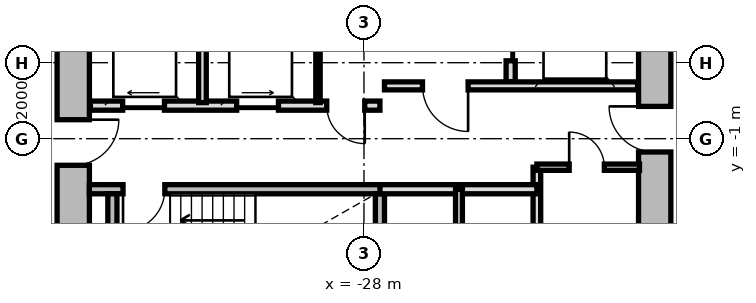
"""IFC4 building model, lengths in metres.
Left out: names, types, materials, properties, quantities, classifications, styles, units other than length and angle.
Written with IfcOpenShell. Run it as: python <this file> out.ifc"""

import sys

from ifc_helpers import new_model, si_unit, direction, frame, frame_2d, origin, place, context, subcontext, project, spatial, rectangle, extrude, source, transform, mapped, element, fill, save


model = new_model("IFC4")
c1 = context("Model", 3, precision=1e-05, world=origin(), true_north=direction((0.0, 1.0)))
c2 = subcontext(c1, "Body", "Model", "MODEL_VIEW")
j1 = project(units=[si_unit("LENGTHUNIT", "METRE"), si_unit("PLANEANGLEUNIT", "RADIAN")], contexts=[c1])
p1 = place(None, origin())
s1 = spatial("IfcSite", under=j1, at=p1, CompositionType="ELEMENT")
p2 = place(p1, origin())
s2 = spatial("IfcBuilding", under=s1, at=p2, CompositionType="ELEMENT")
p3 = place(p2, frame((0.0, 0.0, 61.25)))
s3 = spatial("IfcBuildingStorey", under=s2, at=p3, CompositionType="ELEMENT", Elevation=61.25)
m1 = source(origin(), c2, "Body", "SweptSolid", [
    extrude(rectangle(XDim=11.0, YDim=0.85, at=frame_2d((5.5, 0.0))), origin(), (0.0, 0.0, 1.0), 2.79),
])
p4 = place(p3, frame((-35.65, -5.5, 0.0), z_axis=(0.0, 0.0, 1.0), x_axis=(0.0, 1.0, 0.0)))
e1 = element("IfcWall", 1, at=p4, inside=s3, PredefinedType="SHEAR", context=c2, shape_type="MappedRepresentation", body=[
    mapped(m1, transform((0.0, 0.0, 0.0), x_axis=(1.0, 0.0, 0.0), y_axis=(0.0, 1.0, 0.0), z_axis=(0.0, 0.0, 1.0), scale=1.0)),
])
p5 = place(p4, frame((3.8, 0.0, 0.0)))
e2 = element("IfcOpeningElement", 2, at=p5, cuts=e1, PredefinedType="OPENING", context=c2, shape_type="SweptSolid", body=[
    extrude(rectangle(XDim=1.2, YDim=2.15, at=frame_2d((0.6, 1.075))), frame((0.0, 0.435, 0.0), z_axis=(0.0, -1.0, 0.0), x_axis=(1.0, 0.0, 0.0)), (0.0, 0.0, 1.0), 0.87),
])
p6 = place(p3, frame((-20.35, 5.5, 0.0), z_axis=(0.0, 0.0, 1.0), x_axis=(0.0, -1.0, 0.0)))
e3 = element("IfcWall", 3, at=p6, inside=s3, PredefinedType="SHEAR", context=c2, shape_type="MappedRepresentation", body=[
    mapped(m1, transform((0.0, 0.0, 0.0), x_axis=(1.0, 0.0, 0.0), y_axis=(0.0, 1.0, 0.0), z_axis=(0.0, 0.0, 1.0), scale=1.0)),
])
p7 = place(p6, frame((5.65, 0.0, 0.0)))
e4 = element("IfcOpeningElement", 4, at=p7, cuts=e3, PredefinedType="OPENING", context=c2, shape_type="SweptSolid", body=[
    extrude(rectangle(XDim=1.2, YDim=2.15, at=frame_2d((0.6, 1.075))), frame((0.0, 0.435, 0.0), z_axis=(0.0, -1.0, 0.0), x_axis=(1.0, 0.0, 0.0)), (0.0, 0.0, 1.0), 0.87),
])
m2 = source(origin(), c2, "Body", "SweptSolid", [
    extrude(rectangle(XDim=7.765, YDim=0.24, at=frame_2d((3.883, 0.0))), origin(), (0.0, 0.0, 1.0), 2.79),
])
p8 = place(p3, frame((-35.225, -2.33, 0.0), z_axis=(0.0, 0.0, 1.0), x_axis=(1.0, 0.0, 0.0)))
e5 = element("IfcWall", 5, at=p8, inside=s3, PredefinedType="PARTITIONING", context=c2, shape_type="MappedRepresentation", body=[
    mapped(m2, transform((0.0, 0.0, 0.0), x_axis=(1.0, 0.0, 0.0), y_axis=(0.0, 1.0, 0.0), z_axis=(0.0, 0.0, 1.0), scale=1.0)),
])
p9 = place(p8, frame((0.885, 0.0, 0.0)))
e6 = element("IfcOpeningElement", 6, at=p9, cuts=e5, PredefinedType="OPENING", context=c2, shape_type="SweptSolid", body=[
    extrude(rectangle(XDim=1.1, YDim=2.15, at=frame_2d((0.55, 1.075))), frame((0.0, 0.13, 0.0), z_axis=(0.0, -1.0, 0.0), x_axis=(1.0, 0.0, 0.0)), (0.0, 0.0, 1.0), 0.26),
])
m3 = source(origin(), c2, "Body", "SweptSolid", [
    extrude(rectangle(XDim=3.075, YDim=0.24, at=frame_2d((1.538, 0.0))), origin(), (0.0, 0.0, 1.0), 2.79),
])
for number, where, z_axis, x_axis in (
    (7, (-34.62, -5.525, 0.0), (0.0, 0.0, 1.0), (0.0, 1.0, 0.0)),
    (8, (-27.58, -5.525, 0.0), (0.0, 0.0, 1.0), (0.0, 1.0, 0.0)),
):
    element("IfcWall", number, at=place(p3, frame(where, z_axis=z_axis, x_axis=x_axis)), inside=s3, PredefinedType="PARTITIONING", context=c2, shape_type="MappedRepresentation", body=[
        mapped(m3, transform((0.0, 0.0, 0.0), x_axis=(1.0, 0.0, 0.0), y_axis=(0.0, 1.0, 0.0), z_axis=(0.0, 0.0, 1.0), scale=1.0)),
    ])
m4 = source(origin(), c2, "Body", "SweptSolid", [
    extrude(rectangle(XDim=5.0, YDim=0.24, at=frame_2d((2.5, 0.0))), origin(), (0.0, 0.0, 1.0), 2.775),
])
p10 = place(p3, frame((-24.14, 0.5, 0.0), z_axis=(0.0, 0.0, 1.0), x_axis=(0.0, 1.0, 0.0)))
e9 = element("IfcWall", 9, at=p10, inside=s3, PredefinedType="PARTITIONING", context=c2, shape_type="MappedRepresentation", body=[
    mapped(m4, transform((0.0, 0.0, 0.0), x_axis=(1.0, 0.0, 0.0), y_axis=(0.0, 1.0, 0.0), z_axis=(0.0, 0.0, 1.0), scale=1.0)),
])
p11 = place(p10, frame((3.05, 0.0, 0.0)))
e10 = element("IfcOpeningElement", 10, at=p11, cuts=e9, PredefinedType="OPENING", context=c2, shape_type="SweptSolid", body=[
    extrude(rectangle(XDim=1.3, YDim=2.2, at=frame_2d((0.65, 1.1))), frame((0.0, 0.13, 0.0), z_axis=(0.0, -1.0, 0.0), x_axis=(1.0, 0.0, 0.0)), (0.0, 0.0, 1.0), 0.26),
])
p12 = place(p10, frame((0.55, 0.0, 0.0)))
e11 = element("IfcOpeningElement", 11, at=p12, cuts=e9, PredefinedType="OPENING", context=c2, shape_type="SweptSolid", body=[
    extrude(rectangle(XDim=1.3, YDim=2.2, at=frame_2d((0.65, 1.1))), frame((0.0, 0.13, 0.0), z_axis=(0.0, -1.0, 0.0), x_axis=(1.0, 0.0, 0.0)), (0.0, 0.0, 1.0), 0.26),
])
m5 = source(origin(), c2, "Body", "SweptSolid", [
    extrude(rectangle(XDim=6.66, YDim=0.21, at=frame_2d((3.33, 0.0))), origin(), (0.0, 0.0, 1.0), 2.775),
])
p13 = place(p3, frame((-27.46, 0.39, 0.0), z_axis=(0.0, 0.0, 1.0), x_axis=(1.0, 0.0, 0.0)))
e12 = element("IfcWall", 12, at=p13, inside=s3, PredefinedType="PARTITIONING", context=c2, shape_type="MappedRepresentation", body=[
    mapped(m5, transform((0.0, 0.0, 0.0), x_axis=(1.0, 0.0, 0.0), y_axis=(0.0, 1.0, 0.0), z_axis=(0.0, 0.0, 1.0), scale=1.0)),
])
p14 = place(p13, frame((1.0, 0.0, 0.0)))
e13 = element("IfcOpeningElement", 13, at=p14, cuts=e12, PredefinedType="OPENING", context=c2, shape_type="SweptSolid", body=[
    extrude(rectangle(XDim=1.2, YDim=2.15, at=frame_2d((0.6, 1.075))), frame((0.0, 0.115, 0.0), z_axis=(0.0, -1.0, 0.0), x_axis=(1.0, 0.0, 0.0)), (0.0, 0.0, 1.0), 0.23),
])
m6 = source(origin(), c2, "Body", "SweptSolid", [
    extrude(rectangle(XDim=7.62, YDim=0.24, at=frame_2d((3.81, 0.0))), origin(), (0.0, 0.0, 1.0), 2.775),
])
p15 = place(p3, frame((-35.2, -0.13, 0.0), z_axis=(0.0, 0.0, 1.0), x_axis=(1.0, 0.0, 0.0)))
e14 = element("IfcWall", 14, at=p15, inside=s3, PredefinedType="PARTITIONING", context=c2, shape_type="MappedRepresentation", body=[
    mapped(m6, transform((0.0, 0.0, 0.0), x_axis=(1.0, 0.0, 0.0), y_axis=(0.0, 1.0, 0.0), z_axis=(0.0, 0.0, 1.0), scale=1.0)),
])
p16 = place(p15, frame((6.22, 0.0, 0.0)))
e15 = element("IfcOpeningElement", 15, at=p16, cuts=e14, PredefinedType="OPENING", context=c2, shape_type="SweptSolid", body=[
    extrude(rectangle(XDim=1.0, YDim=2.1, at=frame_2d((0.5, 1.05))), frame((0.0, 0.13, 0.0), z_axis=(0.0, -1.0, 0.0), x_axis=(1.0, 0.0, 0.0)), (0.0, 0.0, 1.0), 0.26),
])
p17 = place(p15, frame((0.85, 0.0, 0.0)))
e16 = element("IfcOpeningElement", 16, at=p17, cuts=e14, PredefinedType="OPENING", context=c2, shape_type="SweptSolid", body=[
    extrude(rectangle(XDim=1.1, YDim=2.2, at=frame_2d((0.55, 1.1))), frame((0.0, 0.13, 0.0), z_axis=(0.0, -1.0, 0.0), x_axis=(1.0, 0.0, 0.0)), (0.0, 0.0, 1.0), 0.26),
])
p18 = place(p15, frame((3.85, 0.0, 0.0)))
e17 = element("IfcOpeningElement", 17, at=p18, cuts=e14, PredefinedType="OPENING", context=c2, shape_type="SweptSolid", body=[
    extrude(rectangle(XDim=1.1, YDim=2.2, at=frame_2d((0.55, 1.1))), frame((0.0, 0.13, 0.0), z_axis=(0.0, -1.0, 0.0), x_axis=(1.0, 0.0, 0.0)), (0.0, 0.0, 1.0), 0.26),
])
m7 = source(origin(), c2, "Body", "SweptSolid", [
    extrude(rectangle(XDim=2.33, YDim=0.115, at=frame_2d((1.165, 0.0))), origin(), (0.0, 0.0, 1.0), 2.775),
])
p19 = place(p3, frame((-29.21, -0.05, 0.0), z_axis=(0.0, 0.0, 1.0), x_axis=(0.0, 1.0, 0.0)))
e18 = element("IfcWall", 18, at=p19, inside=s3, PredefinedType="PARTITIONING", context=c2, shape_type="MappedRepresentation", body=[
    mapped(m7, transform((0.0, 0.0, 0.0), x_axis=(1.0, 0.0, 0.0), y_axis=(0.0, 1.0, 0.0), z_axis=(0.0, 0.0, 1.0), scale=1.0)),
])
m8 = source(origin(), c2, "Body", "SweptSolid", [
    extrude(rectangle(XDim=2.33, YDim=0.2, at=frame_2d((1.165, 0.0))), origin(), (0.0, 0.0, 1.0), 2.775),
])
p20 = place(p3, frame((-32.25, -0.05, 0.0), z_axis=(0.0, 0.0, 1.0), x_axis=(0.0, 1.0, 0.0)))
e19 = element("IfcWall", 19, at=p20, inside=s3, PredefinedType="PARTITIONING", context=c2, shape_type="MappedRepresentation", body=[
    mapped(m8, transform((0.0, 0.0, 0.0), x_axis=(1.0, 0.0, 0.0), y_axis=(0.0, 1.0, 0.0), z_axis=(0.0, 0.0, 1.0), scale=1.0)),
])
m9 = source(origin(), c2, "Body", "SweptSolid", [
    extrude(rectangle(XDim=3.8, YDim=0.2, at=frame_2d((1.9, 0.0))), origin(), (0.0, 0.0, 1.0), 2.775),
])
p21 = place(p3, frame((-23.45, -5.55, 0.0), z_axis=(0.0, 0.0, 1.0), x_axis=(0.0, 1.0, 0.0)))
e20 = element("IfcWall", 20, at=p21, inside=s3, PredefinedType="PARTITIONING", context=c2, shape_type="MappedRepresentation", body=[
    mapped(m9, transform((0.0, 0.0, 0.0), x_axis=(1.0, 0.0, 0.0), y_axis=(0.0, 1.0, 0.0), z_axis=(0.0, 0.0, 1.0), scale=1.0)),
])
m10 = source(origin(), c2, "Body", "SweptSolid", [
    extrude(rectangle(XDim=4.13, YDim=0.24, at=frame_2d((2.065, 0.0))), origin(), (0.0, 0.0, 1.0), 2.775),
])
p22 = place(p3, frame((-27.58, -2.33, 0.0), z_axis=(0.0, 0.0, 1.0), x_axis=(1.0, 0.0, 0.0)))
e21 = element("IfcWall", 21, at=p22, inside=s3, PredefinedType="PARTITIONING", context=c2, shape_type="MappedRepresentation", body=[
    mapped(m10, transform((0.0, 0.0, 0.0), x_axis=(1.0, 0.0, 0.0), y_axis=(0.0, 1.0, 0.0), z_axis=(0.0, 0.0, 1.0), scale=1.0)),
])
m11 = source(origin(), c2, "Body", "SweptSolid", [
    extrude(rectangle(XDim=3.22, YDim=0.18, at=frame_2d((1.61, 0.0))), origin(), (0.0, 0.0, 1.0), 2.775),
])
p23 = place(p3, frame((-25.5, -5.55, 0.0), z_axis=(0.0, 0.0, 1.0), x_axis=(0.0, 1.0, 0.0)))
e22 = element("IfcWall", 22, at=p23, inside=s3, PredefinedType="PARTITIONING", context=c2, shape_type="MappedRepresentation", body=[
    mapped(m11, transform((0.0, 0.0, 0.0), x_axis=(1.0, 0.0, 0.0), y_axis=(0.0, 1.0, 0.0), z_axis=(0.0, 0.0, 1.0), scale=1.0)),
])
m12 = source(origin(), c2, "Body", "SweptSolid", [
    extrude(rectangle(XDim=2.7, YDim=0.165, at=frame_2d((1.35, 0.0))), origin(), (0.0, 0.0, 1.0), 2.775),
])
p24 = place(p3, frame((-23.45, -1.75, 0.0), z_axis=(0.0, 0.0, 1.0), x_axis=(1.0, 0.0, 0.0)))
e23 = element("IfcWall", 23, at=p24, inside=s3, PredefinedType="PARTITIONING", context=c2, shape_type="MappedRepresentation", body=[
    mapped(m12, transform((0.0, 0.0, 0.0), x_axis=(1.0, 0.0, 0.0), y_axis=(0.0, 1.0, 0.0), z_axis=(0.0, 0.0, 1.0), scale=1.0)),
])
p25 = place(p24, frame((0.85, 0.0, 0.0)))
e24 = element("IfcOpeningElement", 24, at=p25, cuts=e23, PredefinedType="OPENING", context=c2, shape_type="SweptSolid", body=[
    extrude(rectangle(XDim=0.925, YDim=2.1, at=frame_2d((0.462, 1.05))), frame((0.0, 0.093, 0.0), z_axis=(0.0, -1.0, 0.0), x_axis=(1.0, 0.0, 0.0)), (0.0, 0.0, 1.0), 0.185),
])
m13 = source(origin(), c2, "Body", "SweptSolid", [
    extrude(rectangle(XDim=1.1, YDim=2.15, at=frame_2d((0.55, 1.075))), frame((0.0, 0.025, 0.0), z_axis=(0.0, -1.0, 0.0), x_axis=(1.0, 0.0, 0.0)), (0.0, 0.0, 1.0), 0.05),
])
p26 = place(p9, frame((1.1, 0.0, 0.0), z_axis=(0.0, 0.0, 1.0), x_axis=(-1.0, 0.0, 0.0)))
e25 = element("IfcDoor", 25, at=p26, inside=s3, OperationType="SINGLE_SWING_RIGHT", PredefinedType="DOOR", context=c2, shape_type="MappedRepresentation", body=[
    mapped(m13, transform((0.0, 0.0, 0.0), x_axis=(1.0, 0.0, 0.0), y_axis=(0.0, 1.0, 0.0), z_axis=(0.0, 0.0, 1.0), scale=1.0)),
])
fill(e6, e25)
m14 = source(origin(), c2, "Body", "SweptSolid", [
    extrude(rectangle(XDim=1.3, YDim=2.2, at=frame_2d((0.65, 1.1))), frame((0.0, 0.025, 0.0), z_axis=(0.0, -1.0, 0.0), x_axis=(1.0, 0.0, 0.0)), (0.0, 0.0, 1.0), 0.05),
])
p27 = place(p12, origin())
e26 = element("IfcDoor", 26, at=p27, inside=s3, OperationType="SLIDING_TO_RIGHT", PredefinedType="DOOR", context=c2, shape_type="MappedRepresentation", body=[
    mapped(m14, transform((0.0, 0.0, 0.0), x_axis=(1.0, 0.0, 0.0), y_axis=(0.0, 1.0, 0.0), z_axis=(0.0, 0.0, 1.0), scale=1.0)),
])
fill(e11, e26)
m15 = source(origin(), c2, "Body", "SweptSolid", [
    extrude(rectangle(XDim=1.2, YDim=2.15, at=frame_2d((0.6, 1.075))), frame((0.0, 0.025, 0.0), z_axis=(0.0, -1.0, 0.0), x_axis=(1.0, 0.0, 0.0)), (0.0, 0.0, 1.0), 0.05),
])
p28 = place(p14, frame((1.2, 0.0, 0.0), z_axis=(0.0, 0.0, 1.0), x_axis=(-1.0, 0.0, 0.0)))
e27 = element("IfcDoor", 27, at=p28, inside=s3, OperationType="SINGLE_SWING_LEFT", PredefinedType="DOOR", context=c2, shape_type="MappedRepresentation", body=[
    mapped(m15, transform((0.0, 0.0, 0.0), x_axis=(1.0, 0.0, 0.0), y_axis=(0.0, 1.0, 0.0), z_axis=(0.0, 0.0, 1.0), scale=1.0)),
])
fill(e13, e27)
p29 = place(p5, frame((1.2, 0.0, 0.0), z_axis=(0.0, 0.0, 1.0), x_axis=(-1.0, 0.0, 0.0)))
e28 = element("IfcDoor", 28, at=p29, inside=s3, OperationType="SINGLE_SWING_LEFT", PredefinedType="DOOR", context=c2, shape_type="MappedRepresentation", body=[
    mapped(m15, transform((0.0, 0.0, 0.0), x_axis=(1.0, 0.0, 0.0), y_axis=(0.0, 1.0, 0.0), z_axis=(0.0, 0.0, 1.0), scale=1.0)),
])
fill(e2, e28)
p30 = place(p7, frame((1.2, 0.0, 0.0), z_axis=(0.0, 0.0, 1.0), x_axis=(-1.0, 0.0, 0.0)))
e29 = element("IfcDoor", 29, at=p30, inside=s3, OperationType="SINGLE_SWING_RIGHT", PredefinedType="DOOR", context=c2, shape_type="MappedRepresentation", body=[
    mapped(m15, transform((0.0, 0.0, 0.0), x_axis=(1.0, 0.0, 0.0), y_axis=(0.0, 1.0, 0.0), z_axis=(0.0, 0.0, 1.0), scale=1.0)),
])
fill(e4, e29)
m16 = source(origin(), c2, "Body", "SweptSolid", [
    extrude(rectangle(XDim=1.0, YDim=2.1, at=frame_2d((0.5, 1.05))), frame((0.0, 0.025, 0.0), z_axis=(0.0, -1.0, 0.0), x_axis=(1.0, 0.0, 0.0)), (0.0, 0.0, 1.0), 0.05),
])
p31 = place(p16, frame((1.0, 0.0, 0.0), z_axis=(0.0, 0.0, 1.0), x_axis=(-1.0, 0.0, 0.0)))
e30 = element("IfcDoor", 30, at=p31, inside=s3, OperationType="SINGLE_SWING_LEFT", PredefinedType="DOOR", context=c2, shape_type="MappedRepresentation", body=[
    mapped(m16, transform((0.0, 0.0, 0.0), x_axis=(1.0, 0.0, 0.0), y_axis=(0.0, 1.0, 0.0), z_axis=(0.0, 0.0, 1.0), scale=1.0)),
])
fill(e15, e30)
m17 = source(origin(), c2, "Body", "SweptSolid", [
    extrude(rectangle(XDim=1.1, YDim=2.2, at=frame_2d((0.55, 1.1))), frame((0.0, 0.025, 0.0), z_axis=(0.0, -1.0, 0.0), x_axis=(1.0, 0.0, 0.0)), (0.0, 0.0, 1.0), 0.05),
])
p32 = place(p17, origin())
e31 = element("IfcDoor", 31, at=p32, inside=s3, OperationType="SLIDING_TO_LEFT", PredefinedType="DOOR", context=c2, shape_type="MappedRepresentation", body=[
    mapped(m17, transform((0.0, 0.0, 0.0), x_axis=(1.0, 0.0, 0.0), y_axis=(0.0, 1.0, 0.0), z_axis=(0.0, 0.0, 1.0), scale=1.0)),
])
fill(e16, e31)
p33 = place(p18, origin())
e32 = element("IfcDoor", 32, at=p33, inside=s3, OperationType="SLIDING_TO_RIGHT", PredefinedType="DOOR", context=c2, shape_type="MappedRepresentation", body=[
    mapped(m17, transform((0.0, 0.0, 0.0), x_axis=(1.0, 0.0, 0.0), y_axis=(0.0, 1.0, 0.0), z_axis=(0.0, 0.0, 1.0), scale=1.0)),
])
fill(e17, e32)
m18 = source(origin(), c2, "Body", "SweptSolid", [
    extrude(rectangle(XDim=0.925, YDim=2.1, at=frame_2d((0.462, 1.05))), frame((0.0, 0.025, 0.0), z_axis=(0.0, -1.0, 0.0), x_axis=(1.0, 0.0, 0.0)), (0.0, 0.0, 1.0), 0.05),
])
p34 = place(p25, origin())
e33 = element("IfcDoor", 33, at=p34, inside=s3, OperationType="SINGLE_SWING_LEFT", PredefinedType="DOOR", context=c2, shape_type="MappedRepresentation", body=[
    mapped(m18, transform((0.0, 0.0, 0.0), x_axis=(1.0, 0.0, 0.0), y_axis=(0.0, 1.0, 0.0), z_axis=(0.0, 0.0, 1.0), scale=1.0)),
])
fill(e24, e33)
save(model, sys.argv[1])
